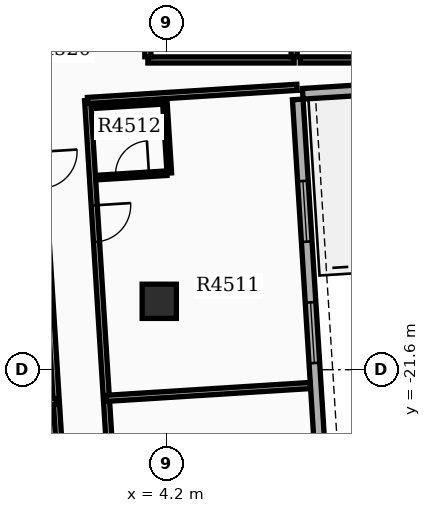
"""IFC4 building model, lengths in metres.
Left out: names, types, materials, properties, quantities, classifications, styles, units other than length and angle.
Written with IfcOpenShell. Run it as: python <this file> out.ifc"""

import sys

from ifc_helpers import new_model, si_unit, direction, frame, frame_2d, origin, origin_2d, place, context, subcontext, project, spatial, rectangle, circle, extrude, element, fill, save


model = new_model("IFC4")
c1 = context("Model", 3, precision=1e-05, world=origin(), true_north=direction((0.0, 1.0)))
c2 = subcontext(c1, "Body", "Model", "MODEL_VIEW")
j1 = project(units=[si_unit("LENGTHUNIT", "METRE"), si_unit("PLANEANGLEUNIT", "RADIAN")], contexts=[c1])
p1 = place(None, origin())
s1 = spatial("IfcSite", under=j1, at=p1, CompositionType="ELEMENT")
p2 = place(p1, origin())
s2 = spatial("IfcBuilding", under=s1, at=p2, CompositionType="ELEMENT")
p3 = place(p2, frame((0.0, 0.0, 281.1)))
s3 = spatial("IfcBuildingStorey", under=s2, at=p3, CompositionType="ELEMENT", Elevation=281.1)
p4 = place(p3, frame((4.0, -19.8, 0.0), z_axis=(0.0, 0.0, 1.0), x_axis=(1.0, 0.0, 0.0)))
e1 = element("IfcColumn", 1, at=p4, inside=s3, PredefinedType="COLUMN", context=c2, shape_type="SweptSolid", body=[
    extrude(circle(Radius=0.45, at=origin_2d()), origin(), (0.0, 0.0, 1.0), 3.9),
])
p5 = place(p3, frame((8.568, -29.16, 0.0), z_axis=(0.0, 0.0, 1.0), x_axis=(-0.062794967833, 0.998026448555, 0.0)))
e2 = element("IfcWall", 2, at=p5, inside=s3, PredefinedType="STANDARD", context=c2, shape_type="SweptSolid", body=[
    extrude(rectangle(XDim=14.7, YDim=0.28, at=frame_2d((7.35, 0.0))), origin(), (0.0, 0.0, 1.0), 3.18),
])
p6 = place(p5, frame((0.85, 0.0, 0.8)))
e3 = element("IfcOpeningElement", 3, at=p6, cuts=e2, PredefinedType="OPENING", context=c2, shape_type="SweptSolid", body=[
    extrude(rectangle(XDim=1.6, YDim=1.7, at=frame_2d((0.8, 0.85))), frame((0.0, 0.15, 0.0), z_axis=(0.0, -1.0, 0.0), x_axis=(1.0, 0.0, 0.0)), (0.0, 0.0, 1.0), 0.3),
])
p7 = place(p5, frame((4.05, 0.0, 0.8)))
e4 = element("IfcOpeningElement", 4, at=p7, cuts=e2, PredefinedType="OPENING", context=c2, shape_type="SweptSolid", body=[
    extrude(rectangle(XDim=1.6, YDim=1.7, at=frame_2d((0.8, 0.85))), frame((0.0, 0.15, 0.0), z_axis=(0.0, -1.0, 0.0), x_axis=(1.0, 0.0, 0.0)), (0.0, 0.0, 1.0), 0.3),
])
p8 = place(p5, frame((7.75, 0.0, 0.8)))
e5 = element("IfcOpeningElement", 5, at=p8, cuts=e2, PredefinedType="OPENING", context=c2, shape_type="SweptSolid", body=[
    extrude(rectangle(XDim=1.6, YDim=1.7, at=frame_2d((0.8, 0.85))), frame((0.0, 0.15, 0.0), z_axis=(0.0, -1.0, 0.0), x_axis=(1.0, 0.0, 0.0)), (0.0, 0.0, 1.0), 0.3),
])
p9 = place(p5, frame((10.95, 0.0, 0.8)))
e6 = element("IfcOpeningElement", 6, at=p9, cuts=e2, PredefinedType="OPENING", context=c2, shape_type="SweptSolid", body=[
    extrude(rectangle(XDim=1.6, YDim=1.7, at=frame_2d((0.8, 0.85))), frame((0.0, 0.15, 0.0), z_axis=(0.0, -1.0, 0.0), x_axis=(1.0, 0.0, 0.0)), (0.0, 0.0, 1.0), 0.3),
])
p10 = place(p3, frame((14.063, -13.945, 0.0), z_axis=(0.0, 0.0, 1.0), x_axis=(-0.998027314704, -0.062781200242, 0.0)))
e7 = element("IfcWall", 7, at=p10, inside=s3, PredefinedType="STANDARD", context=c2, shape_type="SweptSolid", body=[
    extrude(rectangle(XDim=6.3, YDim=0.28, at=frame_2d((3.15, 0.0))), origin(), (0.0, 0.0, 1.0), 3.18),
])
p11 = place(p3, frame((3.7, -13.45, 0.0), z_axis=(0.0, 0.0, 1.0), x_axis=(1.0, 0.0, 0.0)))
e8 = element("IfcWall", 8, at=p11, inside=s3, PredefinedType="PARTITIONING", context=c2, shape_type="SweptSolid", body=[
    extrude(rectangle(XDim=3.85, YDim=0.16, at=frame_2d((1.925, 0.0))), origin(), (0.0, 0.0, 1.0), 3.17),
])
for number, where, z_axis, x_axis in (
    (9, (3.7, -13.365, 0.0), (0.0, 0.0, 1.0), (0.0, 1.0, 0.0)),
    (10, (7.55, -13.365, 0.0), (0.0, 0.0, 1.0), (0.0, 1.0, 0.0)),
):
    element("IfcWall", number, at=place(p3, frame(where, z_axis=z_axis, x_axis=x_axis)), inside=s3, PredefinedType="PARTITIONING", context=c2, shape_type="SweptSolid", body=[
        extrude(rectangle(XDim=1.83, YDim=0.16, at=frame_2d((0.915, 0.0))), origin(), (0.0, 0.0, 1.0), 3.17),
    ])
p12 = place(p3, frame((7.71, -13.45, 0.0), z_axis=(0.0, 0.0, 1.0), x_axis=(1.0, 0.0, 0.0)))
e11 = element("IfcWall", 11, at=p12, inside=s3, PredefinedType="PARTITIONING", context=c2, shape_type="SweptSolid", body=[
    extrude(rectangle(XDim=3.29, YDim=0.16, at=frame_2d((1.645, 0.0))), origin(), (0.0, 0.0, 1.0), 3.17),
])
p13 = place(p3, frame((2.115, -14.516, 0.0), z_axis=(0.0, 0.0, 1.0), x_axis=(0.062791373209, -0.998026674719, 0.0)))
e12 = element("IfcWall", 12, at=p13, inside=s3, PredefinedType="PARTITIONING", context=c2, shape_type="SweptSolid", body=[
    extrude(rectangle(XDim=15.012, YDim=0.16, at=frame_2d((7.506, 0.0))), origin(), (0.0, 0.0, 1.0), 3.17),
])
p14 = place(p13, frame((2.765, 0.0, 0.0)))
e13 = element("IfcOpeningElement", 13, at=p14, cuts=e12, PredefinedType="OPENING", context=c2, shape_type="SweptSolid", body=[
    extrude(rectangle(XDim=0.96, YDim=2.15, at=frame_2d((0.48, 1.075))), frame((0.0, 0.09, 0.0), z_axis=(0.0, -1.0, 0.0), x_axis=(1.0, 0.0, 0.0)), (0.0, 0.0, 1.0), 0.18),
])
p15 = place(p13, frame((11.381, 0.0, 0.0)))
e14 = element("IfcOpeningElement", 14, at=p15, cuts=e12, PredefinedType="OPENING", context=c2, shape_type="SweptSolid", body=[
    extrude(rectangle(XDim=0.96, YDim=2.15, at=frame_2d((0.48, 1.075))), frame((0.0, 0.09, 0.0), z_axis=(0.0, -1.0, 0.0), x_axis=(1.0, 0.0, 0.0)), (0.0, 0.0, 1.0), 0.18),
])
p16 = place(p3, frame((2.115, -14.516, 0.0), z_axis=(0.0, 0.0, 1.0), x_axis=(0.998025986639, 0.062802308829, 0.0)))
e15 = element("IfcWall", 15, at=p16, inside=s3, PredefinedType="PARTITIONING", context=c2, shape_type="SweptSolid", body=[
    extrude(rectangle(XDim=5.52, YDim=0.16, at=frame_2d((2.76, 0.0))), origin(), (0.0, 0.0, 1.0), 3.17),
])
p17 = place(p3, frame((2.609, -22.353, 0.0), z_axis=(0.0, 0.0, 1.0), x_axis=(0.998028633246, 0.062760235987, 0.0)))
e16 = element("IfcWall", 16, at=p17, inside=s3, PredefinedType="PARTITIONING", context=c2, shape_type="SweptSolid", body=[
    extrude(rectangle(XDim=5.372, YDim=0.16, at=frame_2d((2.686, 0.0))), origin(), (0.0, 0.0, 1.0), 3.17),
])
p18 = place(p3, frame((2.383, -16.543, 0.0), z_axis=(0.0, 0.0, 1.0), x_axis=(0.998027972529, 0.062770741989, 0.0)))
e17 = element("IfcWall", 17, at=p18, inside=s3, PredefinedType="PARTITIONING", context=c2, shape_type="SweptSolid", body=[
    extrude(rectangle(XDim=1.82, YDim=0.12, at=frame_2d((0.91, 0.0))), origin(), (0.0, 0.0, 1.0), 3.17),
])
p19 = place(p18, frame((0.47, 0.0, 0.0)))
e18 = element("IfcOpeningElement", 18, at=p19, cuts=e17, PredefinedType="OPENING", context=c2, shape_type="SweptSolid", body=[
    extrude(rectangle(XDim=0.88, YDim=2.1, at=frame_2d((0.44, 1.05))), frame((0.0, 0.07, 0.0), z_axis=(0.0, -1.0, 0.0), x_axis=(1.0, 0.0, 0.0)), (0.0, 0.0, 1.0), 0.14),
])
p20 = place(p3, frame((2.265, -14.667, 0.0), z_axis=(0.0, 0.0, 1.0), x_axis=(0.998027443946, 0.062779145668, 0.0)))
e19 = element("IfcWall", 19, at=p20, inside=s3, PredefinedType="PARTITIONING", context=c2, shape_type="SweptSolid", body=[
    extrude(rectangle(XDim=1.82, YDim=0.12, at=frame_2d((0.91, 0.0))), origin(), (0.0, 0.0, 1.0), 3.17),
])
p21 = place(p3, frame((4.147, -14.548, 0.0), z_axis=(0.0, 0.0, 1.0), x_axis=(0.062725942896, -0.998030789148, 0.0)))
e20 = element("IfcWall", 20, at=p21, inside=s3, PredefinedType="PARTITIONING", context=c2, shape_type="SweptSolid", body=[
    extrude(rectangle(XDim=1.88, YDim=0.12, at=frame_2d((0.94, 0.0))), origin(), (0.0, 0.0, 1.0), 3.17),
])
p22 = place(p3, frame((0.798, -14.599, 0.0), z_axis=(0.0, 0.0, 1.0), x_axis=(0.062791373209, -0.998026674719, 0.0)))
e21 = element("IfcWall", 21, at=p22, inside=s3, PredefinedType="PARTITIONING", context=c2, shape_type="SweptSolid", body=[
    extrude(rectangle(XDim=15.012, YDim=0.16, at=frame_2d((7.506, 0.0))), origin(), (0.0, 0.0, 1.0), 3.17),
])
p23 = place(p22, frame((1.271, 0.0, 0.0)))
e22 = element("IfcOpeningElement", 22, at=p23, cuts=e21, PredefinedType="OPENING", context=c2, shape_type="SweptSolid", body=[
    extrude(rectangle(XDim=0.96, YDim=2.15, at=frame_2d((0.48, 1.075))), frame((0.0, 0.09, 0.0), z_axis=(0.0, -1.0, 0.0), x_axis=(1.0, 0.0, 0.0)), (0.0, 0.0, 1.0), 0.18),
])
p24 = place(p22, frame((11.381, 0.0, 0.0)))
e23 = element("IfcOpeningElement", 23, at=p24, cuts=e21, PredefinedType="OPENING", context=c2, shape_type="SweptSolid", body=[
    extrude(rectangle(XDim=0.96, YDim=2.15, at=frame_2d((0.48, 1.075))), frame((0.0, 0.09, 0.0), z_axis=(0.0, -1.0, 0.0), x_axis=(1.0, 0.0, 0.0)), (0.0, 0.0, 1.0), 0.18),
])
p25 = place(p3, frame((1.291, -22.436, 0.0), z_axis=(0.0, 0.0, 1.0), x_axis=(-0.998027616022, -0.062776410047, 0.0)))
e24 = element("IfcWall", 24, at=p25, inside=s3, PredefinedType="PARTITIONING", context=c2, shape_type="SweptSolid", body=[
    extrude(rectangle(XDim=6.452, YDim=0.16, at=frame_2d((3.226, 0.0))), origin(), (0.0, 0.0, 1.0), 3.17),
])
p26 = place(p8, origin())
e25 = element("IfcWindow", 25, at=p26, inside=s3, PartitioningType="SINGLE_PANEL", PredefinedType="WINDOW", context=c2, shape_type="SweptSolid", body=[
    extrude(rectangle(XDim=1.6, YDim=1.7, at=frame_2d((0.8, 0.85))), frame((0.0, 0.03, 0.0), z_axis=(0.0, -1.0, 0.0), x_axis=(1.0, 0.0, 0.0)), (0.0, 0.0, 1.0), 0.06),
])
fill(e5, e25)
p27 = place(p9, origin())
e26 = element("IfcWindow", 26, at=p27, inside=s3, PartitioningType="SINGLE_PANEL", PredefinedType="WINDOW", context=c2, shape_type="SweptSolid", body=[
    extrude(rectangle(XDim=1.6, YDim=1.7, at=frame_2d((0.8, 0.85))), frame((0.0, 0.03, 0.0), z_axis=(0.0, -1.0, 0.0), x_axis=(1.0, 0.0, 0.0)), (0.0, 0.0, 1.0), 0.06),
])
fill(e6, e26)
p28 = place(p14, origin())
e27 = element("IfcDoor", 27, at=p28, inside=s3, OperationType="SINGLE_SWING_LEFT", PredefinedType="DOOR", context=c2, shape_type="SweptSolid", body=[
    extrude(rectangle(XDim=0.96, YDim=2.15, at=frame_2d((0.48, 1.075))), frame((0.0, 0.025, 0.0), z_axis=(0.0, -1.0, 0.0), x_axis=(1.0, 0.0, 0.0)), (0.0, 0.0, 1.0), 0.05),
])
fill(e13, e27)
p29 = place(p19, origin())
e28 = element("IfcDoor", 28, at=p29, inside=s3, OperationType="SINGLE_SWING_RIGHT", PredefinedType="DOOR", context=c2, shape_type="SweptSolid", body=[
    extrude(rectangle(XDim=0.88, YDim=2.1, at=frame_2d((0.44, 1.05))), frame((0.0, 0.025, 0.0), z_axis=(0.0, -1.0, 0.0), x_axis=(1.0, 0.0, 0.0)), (0.0, 0.0, 1.0), 0.05),
])
fill(e18, e28)
save(model, sys.argv[1])
